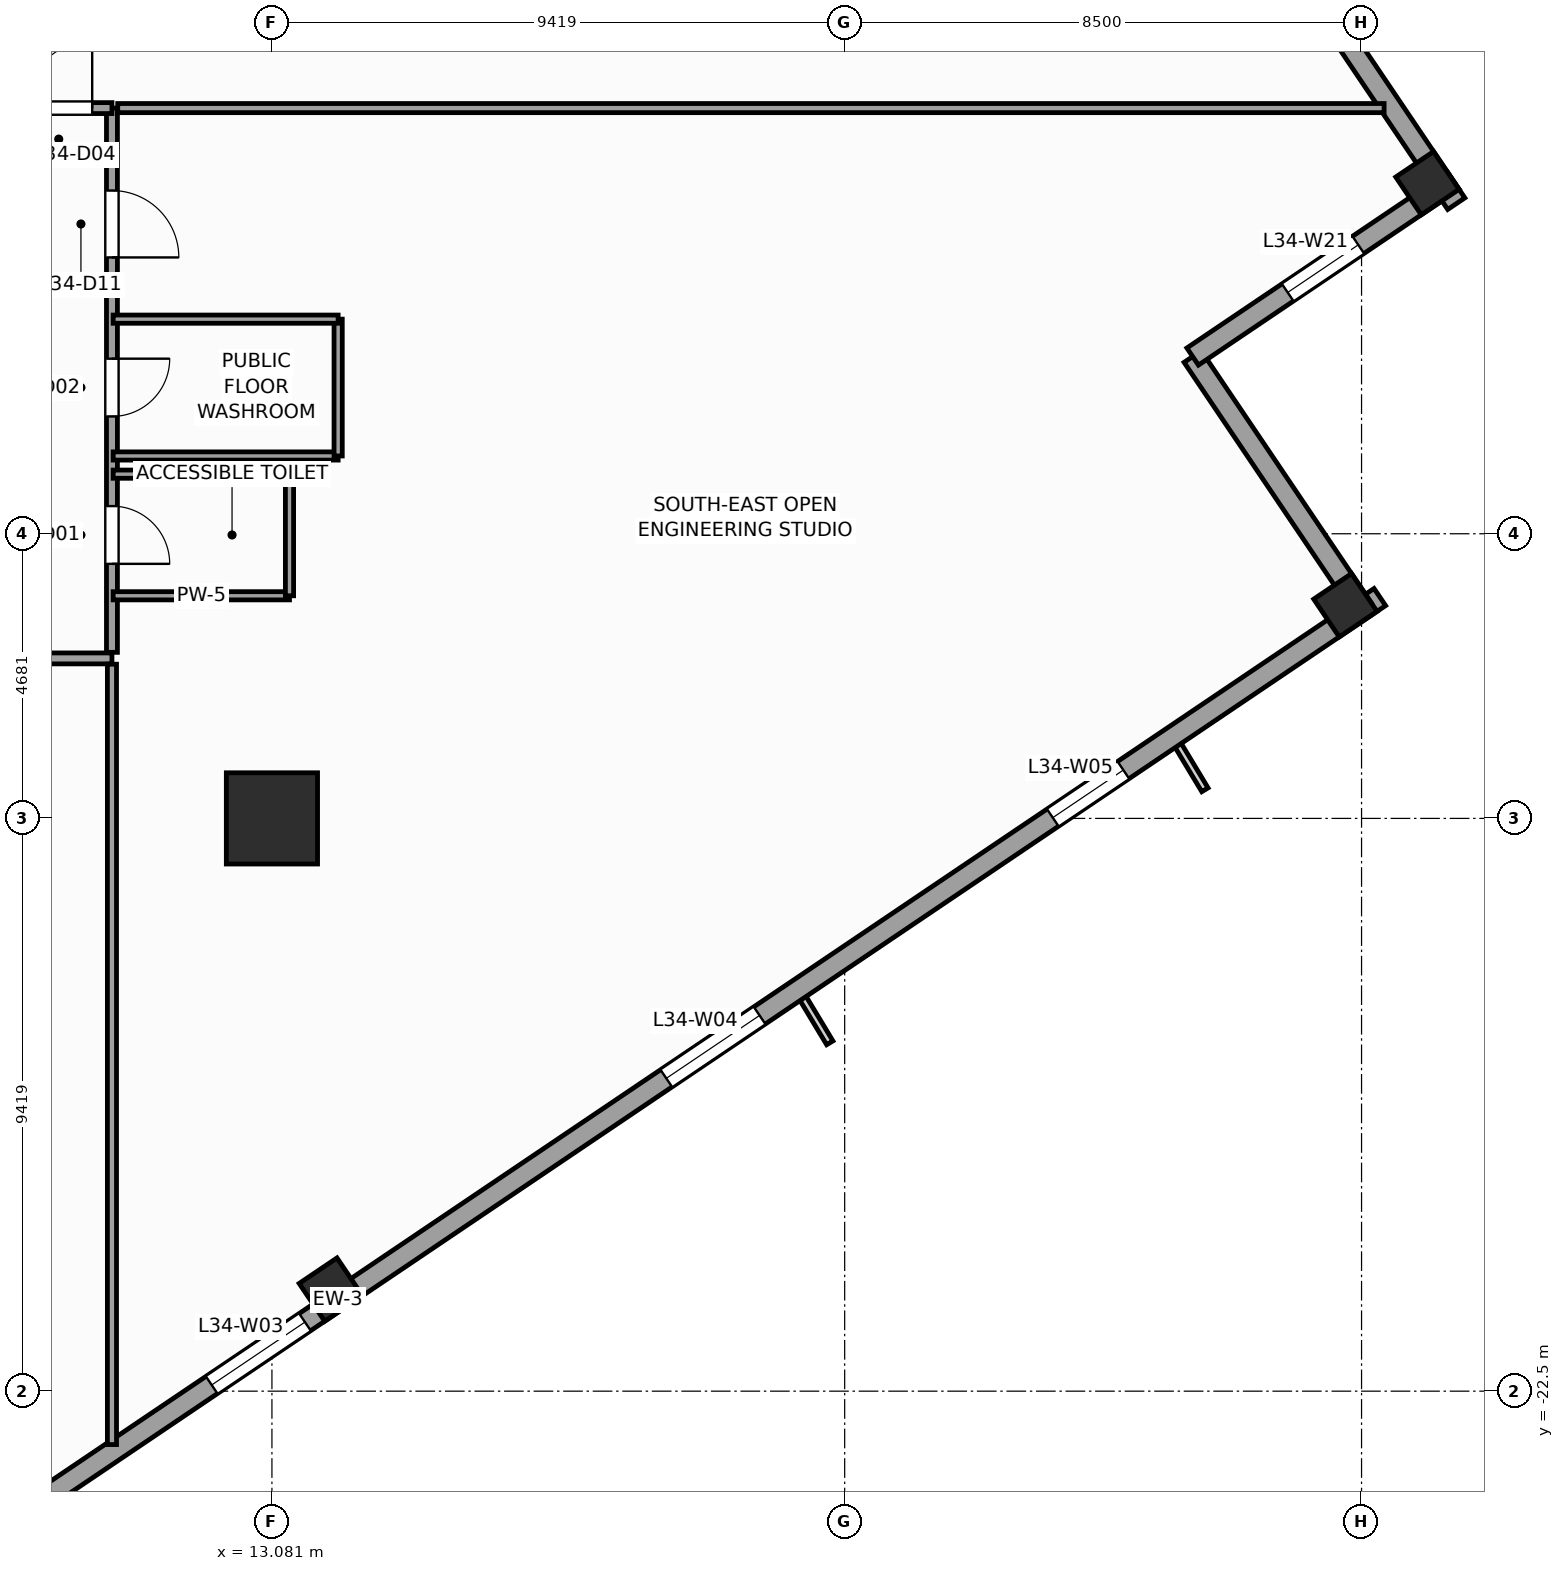
"""IFC4 building model, lengths in metres.
Left out: names, types, materials, properties, quantities, classifications, styles, units other than length and angle.
Written with IfcOpenShell. Run it as: python <this file> out.ifc"""

import sys

from ifc_helpers import new_model, si_unit, direction, frame, frame_2d, origin, origin_2d, place, context, subcontext, project, spatial, rectangle, extrude, source, transform, mapped, element, fill, save


model = new_model("IFC4")
c1 = context("Model", 3, precision=1e-05, world=origin(), true_north=direction((0.0, 1.0)))
c2 = subcontext(c1, "Body", "Model", "MODEL_VIEW")
j1 = project(units=[si_unit("LENGTHUNIT", "METRE"), si_unit("PLANEANGLEUNIT", "RADIAN")], contexts=[c1])
p1 = place(None, origin())
s1 = spatial("IfcSite", under=j1, at=p1, CompositionType="ELEMENT")
p2 = place(p1, origin())
s2 = spatial("IfcBuilding", under=s1, at=p2, CompositionType="ELEMENT")
p3 = place(p2, frame((0.0, 0.0, 144.4)))
s3 = spatial("IfcBuildingStorey", under=s2, at=p3, CompositionType="ELEMENT", Elevation=144.4)
m1 = source(origin(), c2, "Body", "SweptSolid", [
    extrude(rectangle(XDim=1.5, YDim=1.5, at=origin_2d()), origin(), (0.0, 0.0, 1.0), 4.0),
])
p4 = place(p3, frame((13.081, -13.081, 0.0), z_axis=(0.0, 0.0, 1.0), x_axis=(1.0, 0.0, 0.0)))
e1 = element("IfcColumn", 1, at=p4, inside=s3, PredefinedType="COLUMN", context=c2, shape_type="MappedRepresentation", body=[
    mapped(m1, transform((0.0, 0.0, 0.0), scale=1.0)),
])
m2 = source(origin(), c2, "Body", "SweptSolid", [
    extrude(rectangle(XDim=0.75, YDim=0.75, at=origin_2d()), origin(), (0.0, 0.0, 1.0), 4.0),
])
for number, where, z_axis, x_axis in (
    (2, (14.05, -20.83, 0.0), (0.0, 0.0, 1.0), (0.829, 0.559, 0.0)),
    (3, (30.734, -9.576, 0.0), (0.0, 0.0, 1.0), (0.829, 0.559, 0.0)),
    (4, (32.083, -2.635, 0.0), (0.0, 0.0, 1.0), (0.829, 0.559, 0.0)),
):
    element("IfcColumn", number, at=place(p3, frame(where, z_axis=z_axis, x_axis=x_axis)), inside=s3, PredefinedType="COLUMN", context=c2, shape_type="MappedRepresentation", body=[
        mapped(m2, transform((0.0, 0.0, 0.0), scale=1.0)),
    ])
p5 = place(p3, frame((-2.972, -32.558, 0.0), z_axis=(0.0, 0.0, 1.0), x_axis=(0.829036218961, 0.559194910251, 0.0)))
e5 = element("IfcWall", 5, at=p5, inside=s3, PredefinedType="STANDARD", context=c2, shape_type="SweptSolid", body=[
    extrude(rectangle(XDim=41.34, YDim=0.34, at=frame_2d((20.67, 0.0))), origin(), (0.0, 0.0, 1.0), 3.04),
])
p6 = place(p5, frame((4.261, 0.0, 0.56)))
e6 = element("IfcOpeningElement", 6, at=p6, cuts=e5, PredefinedType="OPENING", context=c2, shape_type="SweptSolid", body=[
    extrude(rectangle(XDim=1.4, YDim=2.4, at=frame_2d((0.7, 1.2))), frame((0.0, 0.18, 0.0), z_axis=(0.0, -1.0, 0.0), x_axis=(1.0, 0.0, 0.0)), (0.0, 0.0, 1.0), 0.36),
])
p7 = place(p5, frame((11.064, 0.0, 0.61)))
e7 = element("IfcOpeningElement", 7, at=p7, cuts=e5, PredefinedType="OPENING", context=c2, shape_type="SweptSolid", body=[
    extrude(rectangle(XDim=1.85, YDim=2.35, at=frame_2d((0.925, 1.175))), frame((0.0, 0.18, 0.0), z_axis=(0.0, -1.0, 0.0), x_axis=(1.0, 0.0, 0.0)), (0.0, 0.0, 1.0), 0.36),
])
p8 = place(p5, frame((18.168, 0.0, 0.61)))
e8 = element("IfcOpeningElement", 8, at=p8, cuts=e5, PredefinedType="OPENING", context=c2, shape_type="SweptSolid", body=[
    extrude(rectangle(XDim=1.85, YDim=2.35, at=frame_2d((0.925, 1.175))), frame((0.0, 0.18, 0.0), z_axis=(0.0, -1.0, 0.0), x_axis=(1.0, 0.0, 0.0)), (0.0, 0.0, 1.0), 0.36),
])
p9 = place(p5, frame((27.186, 0.0, 0.61)))
e9 = element("IfcOpeningElement", 9, at=p9, cuts=e5, PredefinedType="OPENING", context=c2, shape_type="SweptSolid", body=[
    extrude(rectangle(XDim=1.85, YDim=2.35, at=frame_2d((0.925, 1.175))), frame((0.0, 0.18, 0.0), z_axis=(0.0, -1.0, 0.0), x_axis=(1.0, 0.0, 0.0)), (0.0, 0.0, 1.0), 0.36),
])
p10 = place(p5, frame((34.852, 0.0, 0.56)))
e10 = element("IfcOpeningElement", 10, at=p10, cuts=e5, PredefinedType="OPENING", context=c2, shape_type="SweptSolid", body=[
    extrude(rectangle(XDim=1.4, YDim=2.4, at=frame_2d((0.7, 1.2))), frame((0.0, 0.18, 0.0), z_axis=(0.0, -1.0, 0.0), x_axis=(1.0, 0.0, 0.0)), (0.0, 0.0, 1.0), 0.36),
])
p11 = place(p3, frame((31.019, -9.631, 0.0), z_axis=(0.0, 0.0, 1.0), x_axis=(-0.559210350234, 0.829025804298, 0.0)))
e11 = element("IfcWall", 11, at=p11, inside=s3, PredefinedType="STANDARD", context=c2, shape_type="SweptSolid", body=[
    extrude(rectangle(XDim=5.0, YDim=0.34, at=frame_2d((2.5, 0.0))), origin(), (0.0, 0.0, 1.0), 3.74),
])
p12 = place(p3, frame((28.223, -5.486, 0.0), z_axis=(0.0, 0.0, 1.0), x_axis=(0.82905227345, 0.559171107879, 0.0)))
e12 = element("IfcWall", 12, at=p12, inside=s3, PredefinedType="STANDARD", context=c2, shape_type="SweptSolid", body=[
    extrude(rectangle(XDim=5.17, YDim=0.34, at=frame_2d((2.585, 0.0))), origin(), (0.0, 0.0, 1.0), 3.04),
])
p13 = place(p12, frame((1.885, 0.0, 0.56)))
e13 = element("IfcOpeningElement", 13, at=p13, cuts=e12, PredefinedType="OPENING", context=c2, shape_type="SweptSolid", body=[
    extrude(rectangle(XDim=1.4, YDim=2.4, at=frame_2d((0.7, 1.2))), frame((0.0, 0.18, 0.0), z_axis=(0.0, -1.0, 0.0), x_axis=(1.0, 0.0, 0.0)), (0.0, 0.0, 1.0), 0.36),
])
p14 = place(p3, frame((32.558, -2.972, 0.0), z_axis=(0.0, 0.0, 1.0), x_axis=(-0.559194910251, 0.829036218961, 0.0)))
e14 = element("IfcWall", 14, at=p14, inside=s3, PredefinedType="STANDARD", context=c2, shape_type="SweptSolid", body=[
    extrude(rectangle(XDim=41.34, YDim=0.34, at=frame_2d((20.67, 0.0))), origin(), (0.0, 0.0, 1.0), 3.04),
])
p15 = place(p14, frame((25.745, 0.0, 0.0)))
e15 = element("IfcOpeningElement", 15, at=p15, cuts=e14, PredefinedType="OPENING", context=c2, shape_type="SweptSolid", body=[
    extrude(rectangle(XDim=1.05, YDim=2.25, at=frame_2d((0.525, 1.125))), frame((0.0, 0.18, 0.0), z_axis=(0.0, -1.0, 0.0), x_axis=(1.0, 0.0, 0.0)), (0.0, 0.0, 1.0), 0.36),
])
p16 = place(p14, frame((4.261, 0.0, 0.56)))
e16 = element("IfcOpeningElement", 16, at=p16, cuts=e14, PredefinedType="OPENING", context=c2, shape_type="SweptSolid", body=[
    extrude(rectangle(XDim=1.4, YDim=2.4, at=frame_2d((0.7, 1.2))), frame((0.0, 0.18, 0.0), z_axis=(0.0, -1.0, 0.0), x_axis=(1.0, 0.0, 0.0)), (0.0, 0.0, 1.0), 0.36),
])
p17 = place(p14, frame((11.064, 0.0, 0.61)))
e17 = element("IfcOpeningElement", 17, at=p17, cuts=e14, PredefinedType="OPENING", context=c2, shape_type="SweptSolid", body=[
    extrude(rectangle(XDim=1.85, YDim=2.35, at=frame_2d((0.925, 1.175))), frame((0.0, 0.18, 0.0), z_axis=(0.0, -1.0, 0.0), x_axis=(1.0, 0.0, 0.0)), (0.0, 0.0, 1.0), 0.36),
])
p18 = place(p14, frame((18.168, 0.0, 0.61)))
e18 = element("IfcOpeningElement", 18, at=p18, cuts=e14, PredefinedType="OPENING", context=c2, shape_type="SweptSolid", body=[
    extrude(rectangle(XDim=1.85, YDim=2.35, at=frame_2d((0.925, 1.175))), frame((0.0, 0.18, 0.0), z_axis=(0.0, -1.0, 0.0), x_axis=(1.0, 0.0, 0.0)), (0.0, 0.0, 1.0), 0.36),
])
p19 = place(p14, frame((27.936, 0.0, 0.61)))
e19 = element("IfcOpeningElement", 19, at=p19, cuts=e14, PredefinedType="OPENING", context=c2, shape_type="SweptSolid", body=[
    extrude(rectangle(XDim=1.85, YDim=2.35, at=frame_2d((0.925, 1.175))), frame((0.0, 0.18, 0.0), z_axis=(0.0, -1.0, 0.0), x_axis=(1.0, 0.0, 0.0)), (0.0, 0.0, 1.0), 0.36),
])
p20 = place(p14, frame((34.852, 0.0, 0.56)))
e20 = element("IfcOpeningElement", 20, at=p20, cuts=e14, PredefinedType="OPENING", context=c2, shape_type="SweptSolid", body=[
    extrude(rectangle(XDim=1.4, YDim=2.4, at=frame_2d((0.7, 1.2))), frame((0.0, 0.18, 0.0), z_axis=(0.0, -1.0, 0.0), x_axis=(1.0, 0.0, 0.0)), (0.0, 0.0, 1.0), 0.36),
])
p21 = place(p3, frame((-10.45, -10.45, 0.0), z_axis=(0.0, 0.0, 1.0), x_axis=(1.0, 0.0, 0.0)))
e21 = element("IfcWall", 21, at=p21, inside=s3, PredefinedType="PARTITIONING", context=c2, shape_type="SweptSolid", body=[
    extrude(rectangle(XDim=20.9, YDim=0.18, at=frame_2d((10.45, 0.0))), origin(), (0.0, 0.0, 1.0), 3.74),
])
p22 = place(p21, frame((2.339, 0.0, 0.0)))
e22 = element("IfcOpeningElement", 22, at=p22, cuts=e21, PredefinedType="OPENING", context=c2, shape_type="SweptSolid", body=[
    extrude(rectangle(XDim=1.1, YDim=2.2, at=frame_2d((0.55, 1.1))), frame((0.0, 0.1, 0.0), z_axis=(0.0, -1.0, 0.0), x_axis=(1.0, 0.0, 0.0)), (0.0, 0.0, 1.0), 0.2),
])
p23 = place(p21, frame((7.4, 0.0, 0.0)))
e23 = element("IfcOpeningElement", 23, at=p23, cuts=e21, PredefinedType="OPENING", context=c2, shape_type="SweptSolid", body=[
    extrude(rectangle(XDim=1.1, YDim=2.2, at=frame_2d((0.55, 1.1))), frame((0.0, 0.1, 0.0), z_axis=(0.0, -1.0, 0.0), x_axis=(1.0, 0.0, 0.0)), (0.0, 0.0, 1.0), 0.2),
])
p24 = place(p21, frame((12.4, 0.0, 0.0)))
e24 = element("IfcOpeningElement", 24, at=p24, cuts=e21, PredefinedType="OPENING", context=c2, shape_type="SweptSolid", body=[
    extrude(rectangle(XDim=1.1, YDim=2.2, at=frame_2d((0.55, 1.1))), frame((0.0, 0.1, 0.0), z_axis=(0.0, -1.0, 0.0), x_axis=(1.0, 0.0, 0.0)), (0.0, 0.0, 1.0), 0.2),
])
p25 = place(p21, frame((17.46, 0.0, 0.0)))
e25 = element("IfcOpeningElement", 25, at=p25, cuts=e21, PredefinedType="OPENING", context=c2, shape_type="SweptSolid", body=[
    extrude(rectangle(XDim=1.1, YDim=2.2, at=frame_2d((0.55, 1.1))), frame((0.0, 0.1, 0.0), z_axis=(0.0, -1.0, 0.0), x_axis=(1.0, 0.0, 0.0)), (0.0, 0.0, 1.0), 0.2),
])
p26 = place(p3, frame((10.45, -10.35, 0.0), z_axis=(0.0, 0.0, 1.0), x_axis=(0.0, 1.0, 0.0)))
e26 = element("IfcWall", 26, at=p26, inside=s3, PredefinedType="PARTITIONING", context=c2, shape_type="SweptSolid", body=[
    extrude(rectangle(XDim=8.95, YDim=0.18, at=frame_2d((4.475, 0.0))), origin(), (0.0, 0.0, 1.0), 3.74),
])
p27 = place(p26, frame((1.455, 0.0, 0.0)))
e27 = element("IfcOpeningElement", 27, at=p27, cuts=e26, PredefinedType="OPENING", context=c2, shape_type="SweptSolid", body=[
    extrude(rectangle(XDim=0.95, YDim=2.1, at=frame_2d((0.475, 1.05))), frame((0.0, 0.1, 0.0), z_axis=(0.0, -1.0, 0.0), x_axis=(1.0, 0.0, 0.0)), (0.0, 0.0, 1.0), 0.2),
])
p28 = place(p26, frame((3.879, 0.0, 0.0)))
e28 = element("IfcOpeningElement", 28, at=p28, cuts=e26, PredefinedType="OPENING", context=c2, shape_type="SweptSolid", body=[
    extrude(rectangle(XDim=0.95, YDim=2.1, at=frame_2d((0.475, 1.05))), frame((0.0, 0.1, 0.0), z_axis=(0.0, -1.0, 0.0), x_axis=(1.0, 0.0, 0.0)), (0.0, 0.0, 1.0), 0.2),
])
p29 = place(p26, frame((6.494, 0.0, 0.0)))
e29 = element("IfcOpeningElement", 29, at=p29, cuts=e26, PredefinedType="OPENING", context=c2, shape_type="SweptSolid", body=[
    extrude(rectangle(XDim=1.1, YDim=2.2, at=frame_2d((0.55, 1.1))), frame((0.0, 0.1, 0.0), z_axis=(0.0, -1.0, 0.0), x_axis=(1.0, 0.0, 0.0)), (0.0, 0.0, 1.0), 0.2),
])
p30 = place(p3, frame((8.7, -1.4, 0.0), z_axis=(0.0, 0.0, 1.0), x_axis=(1.0, 0.0, 0.0)))
e30 = element("IfcWall", 30, at=p30, inside=s3, PredefinedType="PARTITIONING", context=c2, shape_type="SweptSolid", body=[
    extrude(rectangle(XDim=1.75, YDim=0.18, at=frame_2d((0.875, 0.0))), origin(), (0.0, 0.0, 1.0), 3.74),
])
p31 = place(p30, frame((0.325, 0.0, 0.0)))
e31 = element("IfcOpeningElement", 31, at=p31, cuts=e30, PredefinedType="OPENING", context=c2, shape_type="SweptSolid", body=[
    extrude(rectangle(XDim=1.1, YDim=2.2, at=frame_2d((0.55, 1.1))), frame((0.0, 0.1, 0.0), z_axis=(0.0, -1.0, 0.0), x_axis=(1.0, 0.0, 0.0)), (0.0, 0.0, 1.0), 0.2),
])
p32 = place(p3, frame((10.545, -1.4, 0.0), z_axis=(0.0, 0.0, 1.0), x_axis=(1.0, 0.0, 0.0)))
e32 = element("IfcWall", 32, at=p32, inside=s3, PredefinedType="PARTITIONING", context=c2, shape_type="SweptSolid", body=[
    extrude(rectangle(XDim=20.826, YDim=0.15, at=frame_2d((10.413, 0.0))), origin(), (0.0, 0.0, 1.0), 3.74),
])
p33 = place(p3, frame((10.45, -23.378, 0.0), z_axis=(0.0, 0.0, 1.0), x_axis=(0.0, 1.0, 0.0)))
e33 = element("IfcWall", 33, at=p33, inside=s3, PredefinedType="PARTITIONING", context=c2, shape_type="SweptSolid", body=[
    extrude(rectangle(XDim=12.833, YDim=0.15, at=frame_2d((6.417, 0.0))), origin(), (0.0, 0.0, 1.0), 3.74),
])
p34 = place(p3, frame((10.47, -9.42, 0.0), z_axis=(0.0, 0.0, 1.0), x_axis=(1.0, 0.0, 0.0)))
e34 = element("IfcWall", 34, at=p34, inside=s3, PredefinedType="PARTITIONING", context=c2, shape_type="SweptSolid", body=[
    extrude(rectangle(XDim=2.9, YDim=0.135, at=frame_2d((1.45, 0.0))), origin(), (0.0, 0.0, 1.0), 3.74),
])
p35 = place(p3, frame((13.37, -9.42, 0.0), z_axis=(0.0, 0.0, 1.0), x_axis=(0.0, 1.0, 0.0)))
e35 = element("IfcWall", 35, at=p35, inside=s3, PredefinedType="PARTITIONING", context=c2, shape_type="SweptSolid", body=[
    extrude(rectangle(XDim=2.0, YDim=0.135, at=frame_2d((1.0, 0.0))), origin(), (0.0, 0.0, 1.0), 2.84),
])
p36 = place(p3, frame((10.47, -7.42, 0.0), z_axis=(0.0, 0.0, 1.0), x_axis=(1.0, 0.0, 0.0)))
e36 = element("IfcWall", 36, at=p36, inside=s3, PredefinedType="PARTITIONING", context=c2, shape_type="SweptSolid", body=[
    extrude(rectangle(XDim=2.9, YDim=0.135, at=frame_2d((1.45, 0.0))), origin(), (0.0, 0.0, 1.0), 3.74),
])
p37 = place(p3, frame((10.47, -7.121, 0.0), z_axis=(0.0, 0.0, 1.0), x_axis=(1.0, 0.0, 0.0)))
e37 = element("IfcWall", 37, at=p37, inside=s3, PredefinedType="PARTITIONING", context=c2, shape_type="SweptSolid", body=[
    extrude(rectangle(XDim=3.7, YDim=0.135, at=frame_2d((1.85, 0.0))), origin(), (0.0, 0.0, 1.0), 3.74),
])
p38 = place(p3, frame((14.17, -7.121, 0.0), z_axis=(0.0, 0.0, 1.0), x_axis=(0.0, 1.0, 0.0)))
e38 = element("IfcWall", 38, at=p38, inside=s3, PredefinedType="PARTITIONING", context=c2, shape_type="SweptSolid", body=[
    extrude(rectangle(XDim=2.25, YDim=0.135, at=frame_2d((1.125, 0.0))), origin(), (0.0, 0.0, 1.0), 3.74),
])
p39 = place(p3, frame((10.47, -4.871, 0.0), z_axis=(0.0, 0.0, 1.0), x_axis=(1.0, 0.0, 0.0)))
e39 = element("IfcWall", 39, at=p39, inside=s3, PredefinedType="PARTITIONING", context=c2, shape_type="SweptSolid", body=[
    extrude(rectangle(XDim=3.7, YDim=0.135, at=frame_2d((1.85, 0.0))), origin(), (0.0, 0.0, 1.0), 3.74),
])
m3 = source(origin(), c2, "Body", "SweptSolid", [
    extrude(rectangle(XDim=1.85, YDim=2.35, at=frame_2d((0.925, 1.175))), frame((0.0, 0.03, 0.0), z_axis=(0.0, -1.0, 0.0), x_axis=(1.0, 0.0, 0.0)), (0.0, 0.0, 1.0), 0.06),
])
p40 = place(p8, origin())
e40 = element("IfcWindow", 40, at=p40, inside=s3, PartitioningType="SINGLE_PANEL", PredefinedType="WINDOW", context=c2, shape_type="MappedRepresentation", body=[
    mapped(m3, transform((0.0, 0.0, 0.0), scale=1.0)),
])
fill(e8, e40)
p41 = place(p9, origin())
e41 = element("IfcWindow", 41, at=p41, inside=s3, PartitioningType="SINGLE_PANEL", PredefinedType="WINDOW", context=c2, shape_type="MappedRepresentation", body=[
    mapped(m3, transform((0.0, 0.0, 0.0), scale=1.0)),
])
fill(e9, e41)
m4 = source(origin(), c2, "Body", "SweptSolid", [
    extrude(rectangle(XDim=1.4, YDim=2.4, at=frame_2d((0.7, 1.2))), frame((0.0, 0.03, 0.0), z_axis=(0.0, -1.0, 0.0), x_axis=(1.0, 0.0, 0.0)), (0.0, 0.0, 1.0), 0.06),
])
p42 = place(p10, origin())
e42 = element("IfcWindow", 42, at=p42, inside=s3, PartitioningType="SINGLE_PANEL", PredefinedType="WINDOW", context=c2, shape_type="MappedRepresentation", body=[
    mapped(m4, transform((0.0, 0.0, 0.0), scale=1.0)),
])
fill(e10, e42)
p43 = place(p13, origin())
e43 = element("IfcWindow", 43, at=p43, inside=s3, PartitioningType="SINGLE_PANEL", PredefinedType="WINDOW", context=c2, shape_type="MappedRepresentation", body=[
    mapped(m4, transform((0.0, 0.0, 0.0), scale=1.0)),
])
fill(e13, e43)
m5 = source(origin(), c2, "Body", "SweptSolid", [
    extrude(rectangle(XDim=0.95, YDim=2.1, at=frame_2d((0.475, 1.05))), frame((0.0, 0.025, 0.0), z_axis=(0.0, -1.0, 0.0), x_axis=(1.0, 0.0, 0.0)), (0.0, 0.0, 1.0), 0.05),
])
p44 = place(p27, frame((0.95, 0.0, 0.0), z_axis=(0.0, 0.0, 1.0), x_axis=(-1.0, 0.0, 0.0)))
e44 = element("IfcDoor", 44, at=p44, inside=s3, OperationType="SINGLE_SWING_LEFT", PredefinedType="DOOR", context=c2, shape_type="MappedRepresentation", body=[
    mapped(m5, transform((0.0, 0.0, 0.0), scale=1.0)),
])
fill(e27, e44)
p45 = place(p28, frame((0.95, 0.0, 0.0), z_axis=(0.0, 0.0, 1.0), x_axis=(-1.0, 0.0, 0.0)))
e45 = element("IfcDoor", 45, at=p45, inside=s3, OperationType="SINGLE_SWING_RIGHT", PredefinedType="DOOR", context=c2, shape_type="MappedRepresentation", body=[
    mapped(m5, transform((0.0, 0.0, 0.0), scale=1.0)),
])
fill(e28, e45)
m6 = source(origin(), c2, "Body", "SweptSolid", [
    extrude(rectangle(XDim=1.1, YDim=2.2, at=frame_2d((0.55, 1.1))), frame((0.0, 0.025, 0.0), z_axis=(0.0, -1.0, 0.0), x_axis=(1.0, 0.0, 0.0)), (0.0, 0.0, 1.0), 0.05),
])
p46 = place(p31, origin())
e46 = element("IfcDoor", 46, at=p46, inside=s3, OperationType="SINGLE_SWING_RIGHT", PredefinedType="DOOR", context=c2, shape_type="MappedRepresentation", body=[
    mapped(m6, transform((0.0, 0.0, 0.0), scale=1.0)),
])
fill(e31, e46)
p47 = place(p29, frame((1.1, 0.0, 0.0), z_axis=(0.0, 0.0, 1.0), x_axis=(-1.0, 0.0, 0.0)))
e47 = element("IfcDoor", 47, at=p47, inside=s3, OperationType="SINGLE_SWING_LEFT", PredefinedType="DOOR", context=c2, shape_type="MappedRepresentation", body=[
    mapped(m6, transform((0.0, 0.0, 0.0), scale=1.0)),
])
fill(e29, e47)
save(model, sys.argv[1])
